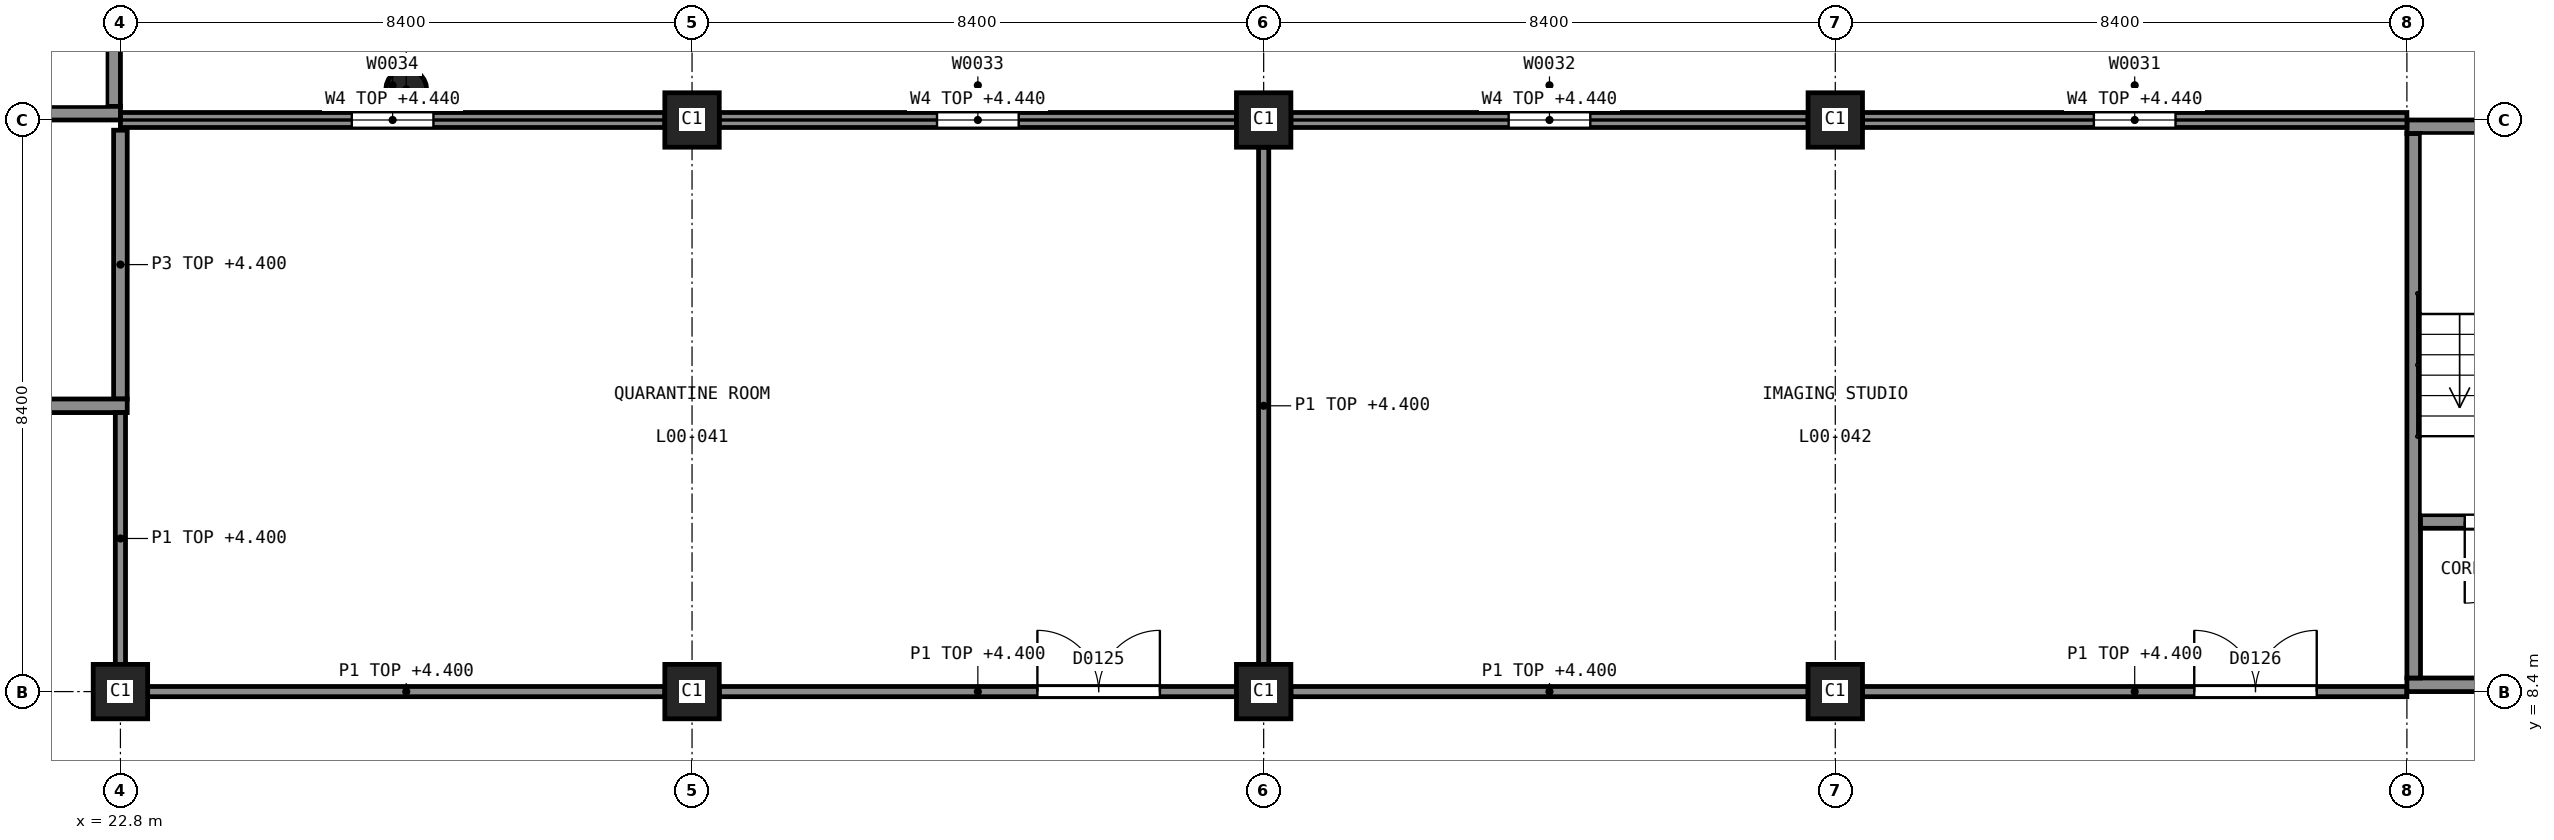
"""IFC4 building model, lengths in metres.
Left out: names, types, materials, properties, quantities, classifications, styles, units other than length and angle.
Written with IfcOpenShell. Run it as: python <this file> out.ifc"""

import sys

from ifc_helpers import new_model, si_unit, direction, frame, frame_2d, origin, origin_2d, place, context, subcontext, project, spatial, rectangle, circle, extrude, element, fill, save


model = new_model("IFC4")
c1 = context("Model", 3, precision=1e-05, world=origin(), true_north=direction((0.0, 1.0)))
c2 = subcontext(c1, "Body", "Model", "MODEL_VIEW")
j1 = project(units=[si_unit("LENGTHUNIT", "METRE"), si_unit("PLANEANGLEUNIT", "RADIAN")], contexts=[c1])
p1 = place(None, origin())
s1 = spatial("IfcSite", under=j1, at=p1, CompositionType="ELEMENT")
p2 = place(p1, origin())
s2 = spatial("IfcBuilding", under=s1, at=p2, CompositionType="ELEMENT")
p3 = place(p2, origin())
s3 = spatial("IfcBuildingStorey", under=s2, at=p3, CompositionType="ELEMENT", Elevation=0.0)
p4 = place(p3, frame((14.4, 16.9, -1.8), z_axis=(0.0, 0.0, 1.0), x_axis=(1.0, 0.0, 0.0)))
e1 = element("IfcWall", 1, at=p4, inside=s3, PredefinedType="SHEAR", context=c2, shape_type="SweptSolid", body=[
    extrude(rectangle(XDim=8.4, YDim=0.2, at=frame_2d((4.2, 0.0))), origin(), (0.0, 0.0, 1.0), 7.3),
])
p5 = place(p3, frame((22.7, 25.0, -1.8), z_axis=(0.0, 0.0, 1.0), x_axis=(0.0, -1.0, 0.0)))
e2 = element("IfcWall", 2, at=p5, inside=s3, PredefinedType="SHEAR", context=c2, shape_type="SweptSolid", body=[
    extrude(rectangle(XDim=8.0, YDim=0.2, at=frame_2d((4.0, 0.0))), origin(), (0.0, 0.0, 1.0), 7.3),
])
p6 = place(p5, frame((0.3, 0.0, 1.8)))
e3 = element("IfcOpeningElement", 3, at=p6, cuts=e2, PredefinedType="OPENING", context=c2, shape_type="SweptSolid", body=[
    extrude(rectangle(XDim=1.6, YDim=2.1, at=frame_2d((0.8, 1.05))), frame((0.0, 0.11, 0.0), z_axis=(0.0, -1.0, 0.0), x_axis=(1.0, 0.0, 0.0)), (0.0, 0.0, 1.0), 0.22),
])
p7 = place(p3, frame((56.4, 8.5, -1.8), z_axis=(0.0, 0.0, 1.0), x_axis=(1.0, 0.0, 0.0)))
e4 = element("IfcWall", 4, at=p7, inside=s3, PredefinedType="SHEAR", context=c2, shape_type="SweptSolid", body=[
    extrude(rectangle(XDim=8.4, YDim=0.2, at=frame_2d((4.2, 0.0))), origin(), (0.0, 0.0, 1.0), 7.3),
])
p8 = place(p7, frame((3.3, 0.0, 1.8)))
e5 = element("IfcOpeningElement", 5, at=p8, cuts=e4, PredefinedType="OPENING", context=c2, shape_type="SweptSolid", body=[
    extrude(rectangle(XDim=1.8, YDim=2.1, at=frame_2d((0.9, 1.05))), frame((0.0, 0.11, 0.0), z_axis=(0.0, -1.0, 0.0), x_axis=(1.0, 0.0, 0.0)), (0.0, 0.0, 1.0), 0.22),
])
p9 = place(p3, frame((56.4, 16.7, -1.8), z_axis=(0.0, 0.0, 1.0), x_axis=(1.0, 0.0, 0.0)))
e6 = element("IfcWall", 6, at=p9, inside=s3, PredefinedType="SHEAR", context=c2, shape_type="SweptSolid", body=[
    extrude(rectangle(XDim=8.4, YDim=0.2, at=frame_2d((4.2, 0.0))), origin(), (0.0, 0.0, 1.0), 7.3),
])
p10 = place(p9, frame((3.001, 0.0, 1.8)))
e7 = element("IfcOpeningElement", 7, at=p10, cuts=e6, PredefinedType="OPENING", context=c2, shape_type="SweptSolid", body=[
    extrude(rectangle(XDim=2.4, YDim=2.1, at=frame_2d((1.2, 1.05))), frame((0.0, 0.11, 0.0), z_axis=(0.0, -1.0, 0.0), x_axis=(1.0, 0.0, 0.0)), (0.0, 0.0, 1.0), 0.22),
])
p11 = place(p3, frame((56.5, 8.6, -1.8), z_axis=(0.0, 0.0, 1.0), x_axis=(0.0, 1.0, 0.0)))
e8 = element("IfcWall", 8, at=p11, inside=s3, PredefinedType="SHEAR", context=c2, shape_type="SweptSolid", body=[
    extrude(rectangle(XDim=8.0, YDim=0.2, at=frame_2d((4.0, 0.0))), origin(), (0.0, 0.0, 1.0), 7.3),
])
p12 = place(p3, frame((56.6, 10.9, -1.8), z_axis=(0.0, 0.0, 1.0), x_axis=(1.0, 0.0, 0.0)))
e9 = element("IfcWall", 9, at=p12, inside=s3, PredefinedType="SHEAR", context=c2, shape_type="SweptSolid", body=[
    extrude(rectangle(XDim=8.0, YDim=0.2, at=frame_2d((4.0, 0.0))), origin(), (0.0, 0.0, 1.0), 7.3),
])
p13 = place(p12, frame((0.65, 0.0, 1.8)))
e10 = element("IfcOpeningElement", 10, at=p13, cuts=e9, PredefinedType="OPENING", context=c2, shape_type="SweptSolid", body=[
    extrude(rectangle(XDim=1.2, YDim=2.1, at=frame_2d((0.6, 1.05))), frame((0.0, 0.11, 0.0), z_axis=(0.0, -1.0, 0.0), x_axis=(1.0, 0.0, 0.0)), (0.0, 0.0, 1.0), 0.22),
])
p14 = place(p12, frame((6.15, 0.0, 1.8)))
e11 = element("IfcOpeningElement", 11, at=p14, cuts=e9, PredefinedType="OPENING", context=c2, shape_type="SweptSolid", body=[
    extrude(rectangle(XDim=1.2, YDim=2.1, at=frame_2d((0.6, 1.05))), frame((0.0, 0.11, 0.0), z_axis=(0.0, -1.0, 0.0), x_axis=(1.0, 0.0, 0.0)), (0.0, 0.0, 1.0), 0.22),
])
p15 = place(p12, frame((3.45, 0.0, 1.8)))
e12 = element("IfcOpeningElement", 12, at=p15, cuts=e9, PredefinedType="OPENING", context=c2, shape_type="SweptSolid", body=[
    extrude(rectangle(XDim=1.1, YDim=2.1, at=frame_2d((0.55, 1.05))), frame((0.0, 0.11, 0.0), z_axis=(0.0, -1.0, 0.0), x_axis=(1.0, 0.0, 0.0)), (0.0, 0.0, 1.0), 0.22),
])
for number, where, z_axis, x_axis in (
    (13, (22.8, 8.4, -0.3), (0.0, 0.0, 1.0), (1.0, 0.0, 0.0)),
    (14, (31.2, 8.4, -0.3), (0.0, 0.0, 1.0), (1.0, 0.0, 0.0)),
    (15, (31.2, 16.8, -0.3), (0.0, 0.0, 1.0), (1.0, 0.0, 0.0)),
    (16, (39.6, 8.4, -0.3), (0.0, 0.0, 1.0), (1.0, 0.0, 0.0)),
    (17, (39.6, 16.8, -0.3), (0.0, 0.0, 1.0), (1.0, 0.0, 0.0)),
    (18, (48.0, 8.4, -0.3), (0.0, 0.0, 1.0), (1.0, 0.0, 0.0)),
    (19, (48.0, 16.8, -0.3), (0.0, 0.0, 1.0), (1.0, 0.0, 0.0)),
):
    element("IfcColumn", number, at=place(p3, frame(where, z_axis=z_axis, x_axis=x_axis)), inside=s3, PredefinedType="COLUMN", context=c2, shape_type="SweptSolid", body=[
        extrude(rectangle(XDim=0.8, YDim=0.8, at=origin_2d()), origin(), (0.0, 0.0, 1.0), 5.8),
    ])
p16 = place(p3, frame((27.0, 17.25, -0.3), z_axis=(0.0, 0.0, 1.0), x_axis=(1.0, 0.0, 0.0)))
e20 = element("IfcColumn", 20, at=p16, inside=s3, PredefinedType="COLUMN", context=c2, shape_type="SweptSolid", body=[
    extrude(circle(Radius=0.3, at=origin_2d()), origin(), (0.0, 0.0, 1.0), 5.8),
])
p17 = place(p3, frame((48.4, 16.8, 0.0), z_axis=(0.0, 0.0, 1.0), x_axis=(1.0, 0.0, 0.0)))
e21 = element("IfcWall", 21, at=p17, inside=s3, PredefinedType="SOLIDWALL", context=c2, shape_type="SweptSolid", body=[
    extrude(rectangle(XDim=8.0, YDim=0.22, at=frame_2d((4.0, 0.0))), origin(), (0.0, 0.0, 1.0), 4.44),
])
p18 = place(p17, frame((3.4, 0.0, 2.1)))
e22 = element("IfcOpeningElement", 22, at=p18, cuts=e21, PredefinedType="OPENING", context=c2, shape_type="SweptSolid", body=[
    extrude(rectangle(XDim=1.2, YDim=0.6, at=frame_2d((0.6, 0.3))), frame((0.0, 0.12, 0.0), z_axis=(0.0, -1.0, 0.0), x_axis=(1.0, 0.0, 0.0)), (0.0, 0.0, 1.0), 0.24),
])
p19 = place(p3, frame((40.0, 16.8, 0.0), z_axis=(0.0, 0.0, 1.0), x_axis=(1.0, 0.0, 0.0)))
e23 = element("IfcWall", 23, at=p19, inside=s3, PredefinedType="SOLIDWALL", context=c2, shape_type="SweptSolid", body=[
    extrude(rectangle(XDim=7.6, YDim=0.22, at=frame_2d((3.8, 0.0))), origin(), (0.0, 0.0, 1.0), 4.44),
])
p20 = place(p19, frame((3.2, 0.0, 2.1)))
e24 = element("IfcOpeningElement", 24, at=p20, cuts=e23, PredefinedType="OPENING", context=c2, shape_type="SweptSolid", body=[
    extrude(rectangle(XDim=1.2, YDim=0.6, at=frame_2d((0.6, 0.3))), frame((0.0, 0.12, 0.0), z_axis=(0.0, -1.0, 0.0), x_axis=(1.0, 0.0, 0.0)), (0.0, 0.0, 1.0), 0.24),
])
p21 = place(p3, frame((31.6, 16.8, 0.0), z_axis=(0.0, 0.0, 1.0), x_axis=(1.0, 0.0, 0.0)))
e25 = element("IfcWall", 25, at=p21, inside=s3, PredefinedType="SOLIDWALL", context=c2, shape_type="SweptSolid", body=[
    extrude(rectangle(XDim=7.6, YDim=0.22, at=frame_2d((3.8, 0.0))), origin(), (0.0, 0.0, 1.0), 4.44),
])
p22 = place(p21, frame((3.2, 0.0, 2.1)))
e26 = element("IfcOpeningElement", 26, at=p22, cuts=e25, PredefinedType="OPENING", context=c2, shape_type="SweptSolid", body=[
    extrude(rectangle(XDim=1.2, YDim=0.6, at=frame_2d((0.6, 0.3))), frame((0.0, 0.12, 0.0), z_axis=(0.0, -1.0, 0.0), x_axis=(1.0, 0.0, 0.0)), (0.0, 0.0, 1.0), 0.24),
])
p23 = place(p3, frame((22.8, 16.8, 0.0), z_axis=(0.0, 0.0, 1.0), x_axis=(1.0, 0.0, 0.0)))
e27 = element("IfcWall", 27, at=p23, inside=s3, PredefinedType="SOLIDWALL", context=c2, shape_type="SweptSolid", body=[
    extrude(rectangle(XDim=8.0, YDim=0.22, at=frame_2d((4.0, 0.0))), origin(), (0.0, 0.0, 1.0), 4.44),
])
p24 = place(p23, frame((3.4, 0.0, 2.1)))
e28 = element("IfcOpeningElement", 28, at=p24, cuts=e27, PredefinedType="OPENING", context=c2, shape_type="SweptSolid", body=[
    extrude(rectangle(XDim=1.2, YDim=0.6, at=frame_2d((0.6, 0.3))), frame((0.0, 0.12, 0.0), z_axis=(0.0, -1.0, 0.0), x_axis=(1.0, 0.0, 0.0)), (0.0, 0.0, 1.0), 0.24),
])
p25 = place(p3, frame((22.8, 12.7, 0.0), z_axis=(0.0, 0.0, 1.0), x_axis=(0.0, 1.0, 0.0)))
e29 = element("IfcWall", 29, at=p25, inside=s3, PredefinedType="PARTITIONING", context=c2, shape_type="SweptSolid", body=[
    extrude(rectangle(XDim=3.95, YDim=0.2, at=frame_2d((1.975, 0.0))), origin(), (0.0, 0.0, 1.0), 4.4),
])
p26 = place(p3, frame((14.4, 12.6, 0.0), z_axis=(0.0, 0.0, 1.0), x_axis=(1.0, 0.0, 0.0)))
e30 = element("IfcWall", 30, at=p26, inside=s3, PredefinedType="PARTITIONING", context=c2, shape_type="SweptSolid", body=[
    extrude(rectangle(XDim=8.5, YDim=0.2, at=frame_2d((4.25, 0.0))), origin(), (0.0, 0.0, 1.0), 4.4),
])
p27 = place(p26, frame((1.775, 0.0, 0.0)))
e31 = element("IfcOpeningElement", 31, at=p27, cuts=e30, PredefinedType="OPENING", context=c2, shape_type="SweptSolid", body=[
    extrude(rectangle(XDim=1.0, YDim=2.1, at=frame_2d((0.5, 1.05))), frame((0.0, 0.11, 0.0), z_axis=(0.0, -1.0, 0.0), x_axis=(1.0, 0.0, 0.0)), (0.0, 0.0, 1.0), 0.22),
])
p28 = place(p3, frame((39.6, 8.8, 0.0), z_axis=(0.0, 0.0, 1.0), x_axis=(0.0, 1.0, 0.0)))
e32 = element("IfcWall", 32, at=p28, inside=s3, PredefinedType="PARTITIONING", context=c2, shape_type="SweptSolid", body=[
    extrude(rectangle(XDim=7.6, YDim=0.15, at=frame_2d((3.8, 0.0))), origin(), (0.0, 0.0, 1.0), 4.4),
])
p29 = place(p3, frame((23.2, 8.4, 0.0), z_axis=(0.0, 0.0, 1.0), x_axis=(1.0, 0.0, 0.0)))
e33 = element("IfcWall", 33, at=p29, inside=s3, PredefinedType="PARTITIONING", context=c2, shape_type="SweptSolid", body=[
    extrude(rectangle(XDim=7.6, YDim=0.15, at=frame_2d((3.8, 0.0))), origin(), (0.0, 0.0, 1.0), 4.4),
])
p30 = place(p3, frame((31.6, 8.4, 0.0), z_axis=(0.0, 0.0, 1.0), x_axis=(1.0, 0.0, 0.0)))
e34 = element("IfcWall", 34, at=p30, inside=s3, PredefinedType="PARTITIONING", context=c2, shape_type="SweptSolid", body=[
    extrude(rectangle(XDim=7.6, YDim=0.15, at=frame_2d((3.8, 0.0))), origin(), (0.0, 0.0, 1.0), 4.4),
])
p31 = place(p30, frame((4.675, 0.0, 0.0)))
e35 = element("IfcOpeningElement", 35, at=p31, cuts=e34, PredefinedType="OPENING", context=c2, shape_type="SweptSolid", body=[
    extrude(rectangle(XDim=1.8, YDim=2.1, at=frame_2d((0.9, 1.05))), frame((0.0, 0.085, 0.0), z_axis=(0.0, -1.0, 0.0), x_axis=(1.0, 0.0, 0.0)), (0.0, 0.0, 1.0), 0.17),
])
p32 = place(p3, frame((40.0, 8.4, 0.0), z_axis=(0.0, 0.0, 1.0), x_axis=(1.0, 0.0, 0.0)))
e36 = element("IfcWall", 36, at=p32, inside=s3, PredefinedType="PARTITIONING", context=c2, shape_type="SweptSolid", body=[
    extrude(rectangle(XDim=7.6, YDim=0.15, at=frame_2d((3.8, 0.0))), origin(), (0.0, 0.0, 1.0), 4.4),
])
p33 = place(p3, frame((48.4, 8.4, 0.0), z_axis=(0.0, 0.0, 1.0), x_axis=(1.0, 0.0, 0.0)))
e37 = element("IfcWall", 37, at=p33, inside=s3, PredefinedType="PARTITIONING", context=c2, shape_type="SweptSolid", body=[
    extrude(rectangle(XDim=8.0, YDim=0.15, at=frame_2d((4.0, 0.0))), origin(), (0.0, 0.0, 1.0), 4.4),
])
p34 = place(p33, frame((4.875, 0.0, 0.0)))
e38 = element("IfcOpeningElement", 38, at=p34, cuts=e37, PredefinedType="OPENING", context=c2, shape_type="SweptSolid", body=[
    extrude(rectangle(XDim=1.8, YDim=2.1, at=frame_2d((0.9, 1.05))), frame((0.0, 0.085, 0.0), z_axis=(0.0, -1.0, 0.0), x_axis=(1.0, 0.0, 0.0)), (0.0, 0.0, 1.0), 0.17),
])
p35 = place(p3, frame((22.8, 8.8, 0.0), z_axis=(0.0, 0.0, 1.0), x_axis=(0.0, 1.0, 0.0)))
e39 = element("IfcWall", 39, at=p35, inside=s3, PredefinedType="PARTITIONING", context=c2, shape_type="SweptSolid", body=[
    extrude(rectangle(XDim=3.7, YDim=0.15, at=frame_2d((1.85, 0.0))), origin(), (0.0, 0.0, 1.0), 4.4),
])
p36 = place(p18, origin())
e40 = element("IfcWindow", 40, at=p36, inside=s3, PartitioningType="SINGLE_PANEL", PredefinedType="WINDOW", context=c2, shape_type="SweptSolid", body=[
    extrude(rectangle(XDim=1.2, YDim=0.6, at=frame_2d((0.6, 0.3))), frame((0.0, -0.03, 0.0), z_axis=(0.0, -1.0, 0.0), x_axis=(1.0, 0.0, 0.0)), (0.0, 0.0, 1.0), 0.06),
])
fill(e22, e40)
p37 = place(p20, origin())
e41 = element("IfcWindow", 41, at=p37, inside=s3, PartitioningType="SINGLE_PANEL", PredefinedType="WINDOW", context=c2, shape_type="SweptSolid", body=[
    extrude(rectangle(XDim=1.2, YDim=0.6, at=frame_2d((0.6, 0.3))), frame((0.0, -0.03, 0.0), z_axis=(0.0, -1.0, 0.0), x_axis=(1.0, 0.0, 0.0)), (0.0, 0.0, 1.0), 0.06),
])
fill(e24, e41)
p38 = place(p22, origin())
e42 = element("IfcWindow", 42, at=p38, inside=s3, PartitioningType="SINGLE_PANEL", PredefinedType="WINDOW", context=c2, shape_type="SweptSolid", body=[
    extrude(rectangle(XDim=1.2, YDim=0.6, at=frame_2d((0.6, 0.3))), frame((0.0, -0.03, 0.0), z_axis=(0.0, -1.0, 0.0), x_axis=(1.0, 0.0, 0.0)), (0.0, 0.0, 1.0), 0.06),
])
fill(e26, e42)
p39 = place(p24, origin())
e43 = element("IfcWindow", 43, at=p39, inside=s3, PartitioningType="SINGLE_PANEL", PredefinedType="WINDOW", context=c2, shape_type="SweptSolid", body=[
    extrude(rectangle(XDim=1.2, YDim=0.6, at=frame_2d((0.6, 0.3))), frame((0.0, -0.03, 0.0), z_axis=(0.0, -1.0, 0.0), x_axis=(1.0, 0.0, 0.0)), (0.0, 0.0, 1.0), 0.06),
])
fill(e28, e43)
p40 = place(p31, origin())
e44 = element("IfcDoor", 44, at=p40, inside=s3, OperationType="DOUBLE_DOOR_SINGLE_SWING", PredefinedType="DOOR", context=c2, shape_type="SweptSolid", body=[
    extrude(rectangle(XDim=1.8, YDim=2.1, at=frame_2d((0.9, 1.05))), frame((0.0, 0.025, 0.0), z_axis=(0.0, -1.0, 0.0), x_axis=(1.0, 0.0, 0.0)), (0.0, 0.0, 1.0), 0.05),
])
fill(e35, e44)
p41 = place(p34, origin())
e45 = element("IfcDoor", 45, at=p41, inside=s3, OperationType="DOUBLE_DOOR_SINGLE_SWING", PredefinedType="DOOR", context=c2, shape_type="SweptSolid", body=[
    extrude(rectangle(XDim=1.8, YDim=2.1, at=frame_2d((0.9, 1.05))), frame((0.0, 0.025, 0.0), z_axis=(0.0, -1.0, 0.0), x_axis=(1.0, 0.0, 0.0)), (0.0, 0.0, 1.0), 0.05),
])
fill(e38, e45)
p42 = place(p13, origin())
e46 = element("IfcDoor", 46, at=p42, inside=s3, OperationType="SINGLE_SWING_LEFT", PredefinedType="DOOR", context=c2, shape_type="SweptSolid", body=[
    extrude(rectangle(XDim=1.2, YDim=2.1, at=frame_2d((0.6, 1.05))), frame((0.0, 0.025, 0.0), z_axis=(0.0, -1.0, 0.0), x_axis=(1.0, 0.0, 0.0)), (0.0, 0.0, 1.0), 0.05),
])
fill(e10, e46)
save(model, sys.argv[1])
